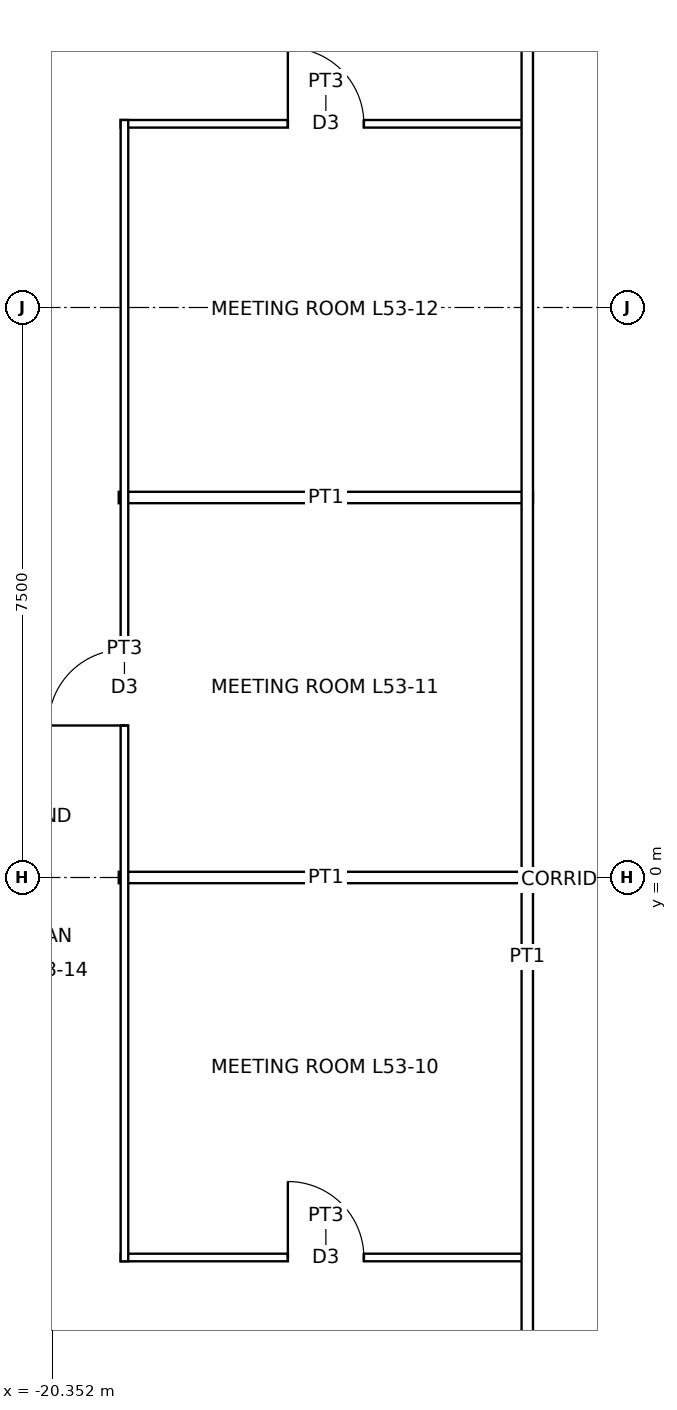
"""IFC4 building model, lengths in metres.
Left out: names, types, materials, properties, quantities, classifications, styles, units other than length and angle.
Written with IfcOpenShell. Run it as: python <this file> out.ifc"""

import sys

from ifc_helpers import new_model, si_unit, direction, frame, frame_2d, origin, place, context, subcontext, project, spatial, rectangle, extrude, element, fill, save


model = new_model("IFC4")
c1 = context("Model", 3, precision=1e-05, world=origin(), true_north=direction((0.0, 1.0)))
c2 = subcontext(c1, "Body", "Model", "MODEL_VIEW")
j1 = project(units=[si_unit("LENGTHUNIT", "METRE"), si_unit("PLANEANGLEUNIT", "RADIAN")], contexts=[c1])
p1 = place(None, origin())
s1 = spatial("IfcSite", under=j1, at=p1, CompositionType="ELEMENT")
p2 = place(p1, origin())
s2 = spatial("IfcBuilding", under=s1, at=p2, CompositionType="ELEMENT")
p3 = place(p2, frame((0.0, 0.0, 245.9)))
s3 = spatial("IfcBuildingStorey", under=s2, at=p3, CompositionType="ELEMENT", Elevation=245.9)
p4 = place(p3, frame((-19.45, -5.0, 0.0), z_axis=(0.0, 0.0, 1.0), x_axis=(1.0, 0.0, 0.0)))
e1 = element("IfcWall", 1, at=p4, inside=s3, PredefinedType="PARTITIONING", context=c2, shape_type="SweptSolid", body=[
    extrude(rectangle(XDim=5.4, YDim=0.1, at=frame_2d((2.7, 0.0))), origin(), (0.0, 0.0, 1.0), 3.85),
])
p5 = place(p4, frame((2.2, 0.0, 0.0)))
e2 = element("IfcOpeningElement", 2, at=p5, cuts=e1, PredefinedType="OPENING", context=c2, shape_type="SweptSolid", body=[
    extrude(rectangle(XDim=1.0, YDim=2.1, at=frame_2d((0.5, 1.05))), frame((0.0, 0.06, 0.0), z_axis=(0.0, -1.0, 0.0), x_axis=(1.0, 0.0, 0.0)), (0.0, 0.0, 1.0), 0.12),
])
p6 = place(p3, frame((-19.475, 0.0, 0.0), z_axis=(0.0, 0.0, 1.0), x_axis=(1.0, 0.0, 0.0)))
e3 = element("IfcWall", 3, at=p6, inside=s3, PredefinedType="PARTITIONING", context=c2, shape_type="SweptSolid", body=[
    extrude(rectangle(XDim=5.45, YDim=0.15, at=frame_2d((2.725, 0.0))), origin(), (0.0, 0.0, 1.0), 3.238),
])
p7 = place(p3, frame((-19.475, 5.0, 0.0), z_axis=(0.0, 0.0, 1.0), x_axis=(1.0, 0.0, 0.0)))
e4 = element("IfcWall", 4, at=p7, inside=s3, PredefinedType="PARTITIONING", context=c2, shape_type="SweptSolid", body=[
    extrude(rectangle(XDim=5.45, YDim=0.15, at=frame_2d((2.725, 0.0))), origin(), (0.0, 0.0, 1.0), 3.85),
])
p8 = place(p3, frame((-19.45, 9.917, 0.0), z_axis=(0.0, 0.0, 1.0), x_axis=(1.0, 0.0, 0.0)))
e5 = element("IfcWall", 5, at=p8, inside=s3, PredefinedType="PARTITIONING", context=c2, shape_type="SweptSolid", body=[
    extrude(rectangle(XDim=5.4, YDim=0.1, at=frame_2d((2.7, 0.0))), origin(), (0.0, 0.0, 1.0), 3.85),
])
p9 = place(p8, frame((2.2, 0.0, 0.0)))
e6 = element("IfcOpeningElement", 6, at=p9, cuts=e5, PredefinedType="OPENING", context=c2, shape_type="SweptSolid", body=[
    extrude(rectangle(XDim=1.0, YDim=2.1, at=frame_2d((0.5, 1.05))), frame((0.0, 0.06, 0.0), z_axis=(0.0, -1.0, 0.0), x_axis=(1.0, 0.0, 0.0)), (0.0, 0.0, 1.0), 0.12),
])
p10 = place(p3, frame((-19.4, -5.05, 0.0), z_axis=(0.0, 0.0, 1.0), x_axis=(0.0, 1.0, 0.0)))
e7 = element("IfcWall", 7, at=p10, inside=s3, PredefinedType="PARTITIONING", context=c2, shape_type="SweptSolid", body=[
    extrude(rectangle(XDim=15.017, YDim=0.1, at=frame_2d((7.509, 0.0))), origin(), (0.0, 0.0, 1.0), 3.85),
])
p11 = place(p10, frame((7.05, 0.0, 0.0)))
e8 = element("IfcOpeningElement", 8, at=p11, cuts=e7, PredefinedType="OPENING", context=c2, shape_type="SweptSolid", body=[
    extrude(rectangle(XDim=1.0, YDim=2.1, at=frame_2d((0.5, 1.05))), frame((0.0, 0.06, 0.0), z_axis=(0.0, -1.0, 0.0), x_axis=(1.0, 0.0, 0.0)), (0.0, 0.0, 1.0), 0.12),
])
p12 = place(p3, frame((-14.1, -14.175, 0.0), z_axis=(0.0, 0.0, 1.0), x_axis=(0.0, 1.0, 0.0)))
e9 = element("IfcWall", 9, at=p12, inside=s3, PredefinedType="PARTITIONING", context=c2, shape_type="SweptSolid", body=[
    extrude(rectangle(XDim=26.25, YDim=0.15, at=frame_2d((13.125, 0.0))), origin(), (0.0, 0.0, 1.0), 3.85),
])
p13 = place(p12, frame((4.125, 0.0, 0.0)))
e10 = element("IfcOpeningElement", 10, at=p13, cuts=e9, PredefinedType="OPENING", context=c2, shape_type="SweptSolid", body=[
    extrude(rectangle(XDim=1.0, YDim=2.4, at=frame_2d((0.5, 1.2))), frame((0.0, 0.085, 0.0), z_axis=(0.0, -1.0, 0.0), x_axis=(1.0, 0.0, 0.0)), (0.0, 0.0, 1.0), 0.17),
])
p14 = place(p5, origin())
e11 = element("IfcDoor", 11, at=p14, inside=s3, OperationType="SINGLE_SWING_LEFT", PredefinedType="DOOR", context=c2, shape_type="SweptSolid", body=[
    extrude(rectangle(XDim=1.0, YDim=2.1, at=frame_2d((0.5, 1.05))), frame((0.0, 0.025, 0.0), z_axis=(0.0, -1.0, 0.0), x_axis=(1.0, 0.0, 0.0)), (0.0, 0.0, 1.0), 0.05),
])
fill(e2, e11)
p15 = place(p11, origin())
e12 = element("IfcDoor", 12, at=p15, inside=s3, OperationType="SINGLE_SWING_LEFT", PredefinedType="DOOR", context=c2, shape_type="SweptSolid", body=[
    extrude(rectangle(XDim=1.0, YDim=2.1, at=frame_2d((0.5, 1.05))), frame((0.0, 0.025, 0.0), z_axis=(0.0, -1.0, 0.0), x_axis=(1.0, 0.0, 0.0)), (0.0, 0.0, 1.0), 0.05),
])
fill(e8, e12)
p16 = place(p9, origin())
e13 = element("IfcDoor", 13, at=p16, inside=s3, OperationType="SINGLE_SWING_LEFT", PredefinedType="DOOR", context=c2, shape_type="SweptSolid", body=[
    extrude(rectangle(XDim=1.0, YDim=2.1, at=frame_2d((0.5, 1.05))), frame((0.0, 0.025, 0.0), z_axis=(0.0, -1.0, 0.0), x_axis=(1.0, 0.0, 0.0)), (0.0, 0.0, 1.0), 0.05),
])
fill(e6, e13)
save(model, sys.argv[1])
